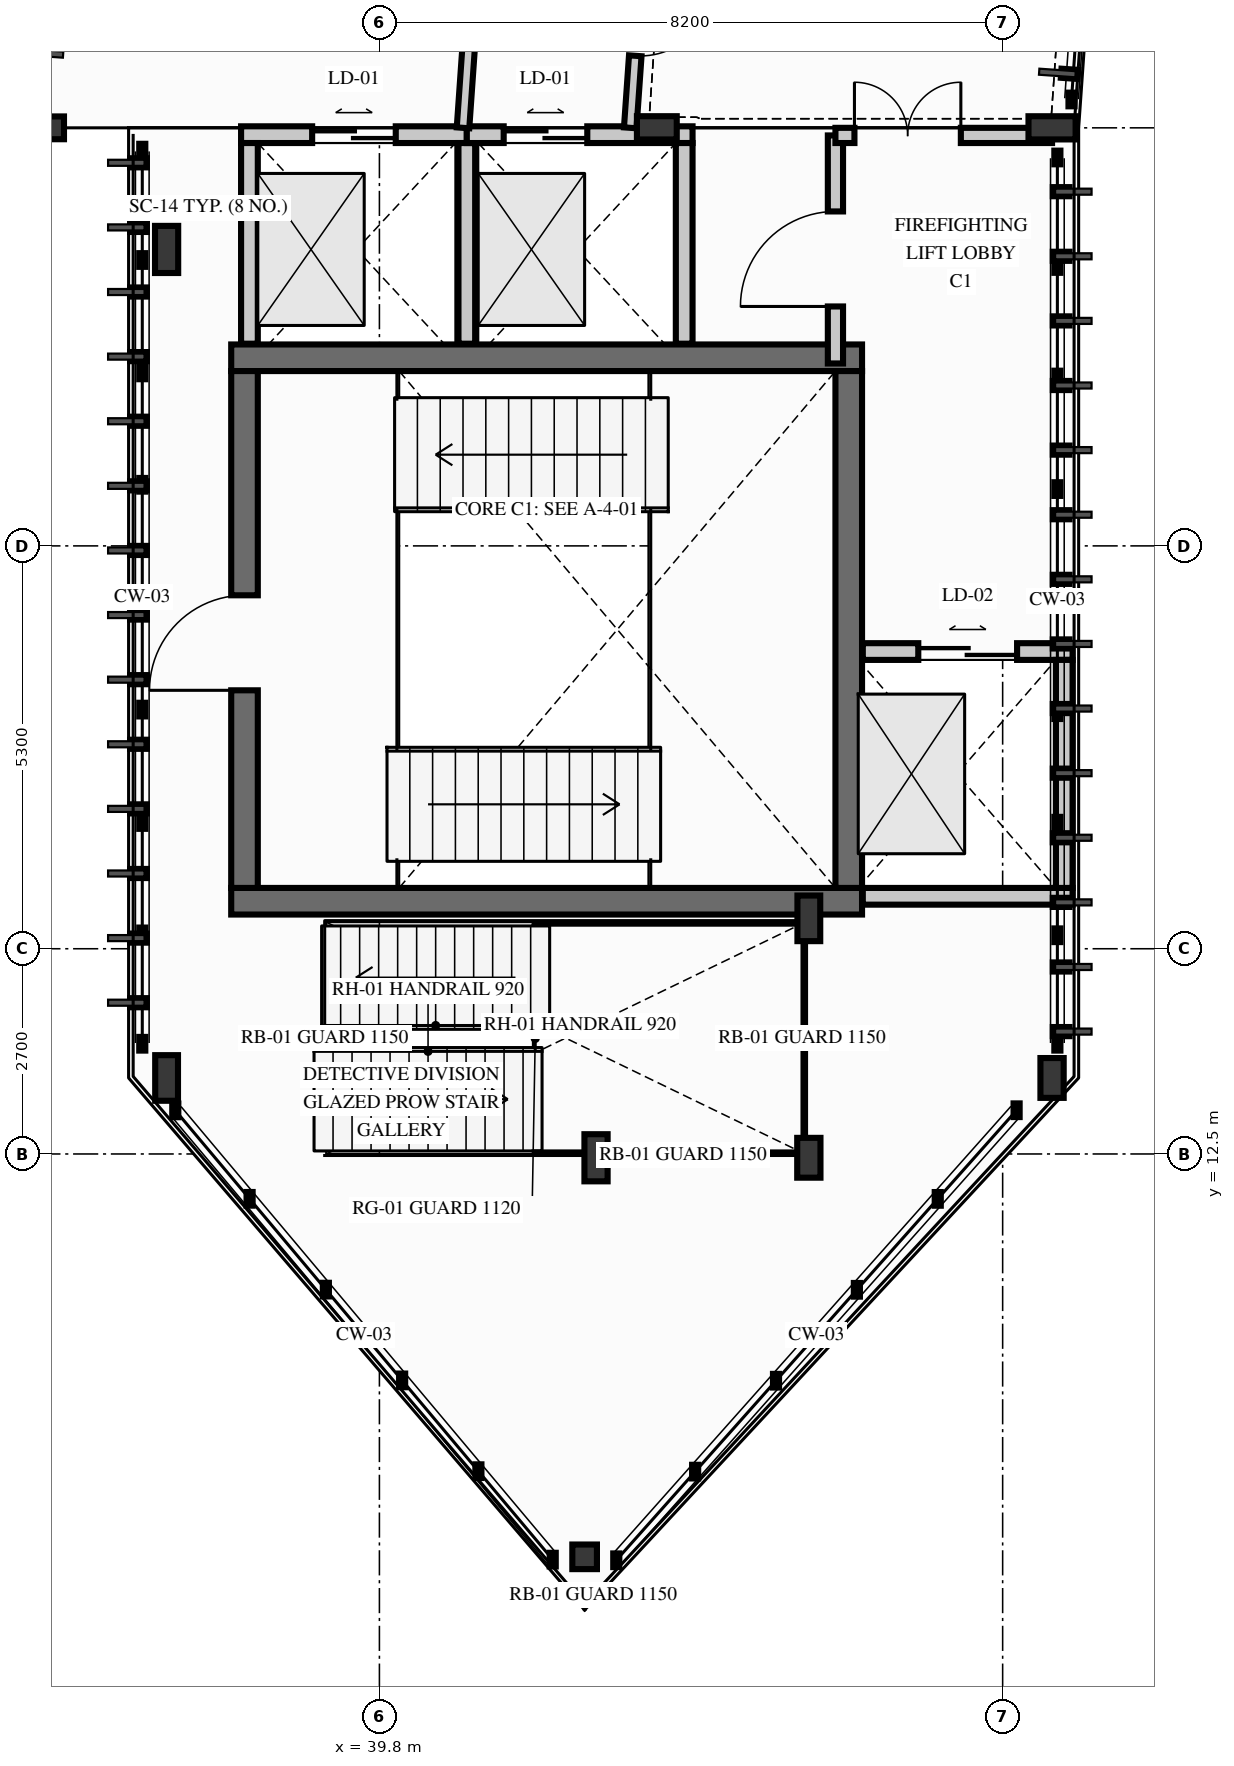
"""IFC4 building model, lengths in metres.
Left out: names, types, materials, properties, quantities, classifications, styles, units other than length and angle.
Written with IfcOpenShell. Run it as: python <this file> out.ifc"""

import sys

from ifc_helpers import new_model, si_unit, direction, frame, frame_2d, origin, origin_2d, place, context, subcontext, project, spatial, rectangle, hollow_circle, i_section, extrude, element, fill, save


model = new_model("IFC4")
c1 = context("Model", 3, precision=1e-05, world=origin(), true_north=direction((0.0, 1.0)))
c2 = subcontext(c1, "Body", "Model", "MODEL_VIEW")
j1 = project(units=[si_unit("LENGTHUNIT", "METRE"), si_unit("PLANEANGLEUNIT", "RADIAN")], contexts=[c1])
p1 = place(None, origin())
s1 = spatial("IfcSite", under=j1, at=p1, CompositionType="ELEMENT")
p2 = place(p1, origin())
s2 = spatial("IfcBuilding", under=s1, at=p2, CompositionType="ELEMENT")
p3 = place(p2, frame((0.0, 0.0, 5.1)))
s3 = spatial("IfcBuildingStorey", under=s2, at=p3, CompositionType="ELEMENT", Elevation=5.1)
for number, where, z_axis, x_axis in (
    (1, (37.85, 15.825, 0.0), (0.0, 0.0, 1.0), (1.0, 0.0, 0.0)),
    (2, (37.85, 22.975, 0.0), (0.0, 0.0, 1.0), (1.0, 0.0, 0.0)),
):
    element("IfcWall", number, at=place(p3, frame(where, z_axis=z_axis, x_axis=x_axis)), inside=s3, PredefinedType="SHEAR", context=c2, shape_type="SweptSolid", body=[
        extrude(rectangle(XDim=8.3, YDim=0.35, at=frame_2d((4.15, 0.0))), origin(), (0.0, 0.0, 1.0), 3.98),
    ])
p4 = place(p3, frame((38.025, 16.0, 0.0), z_axis=(0.0, 0.0, 1.0), x_axis=(0.0, 1.0, 0.0)))
e3 = element("IfcWall", 3, at=p4, inside=s3, PredefinedType="SHEAR", context=c2, shape_type="SweptSolid", body=[
    extrude(rectangle(XDim=6.8, YDim=0.35, at=frame_2d((3.4, 0.0))), origin(), (0.0, 0.0, 1.0), 3.98),
])
p5 = place(p4, frame((2.6, 0.0, 0.0)))
e4 = element("IfcOpeningElement", 4, at=p5, cuts=e3, PredefinedType="OPENING", context=c2, shape_type="SweptSolid", body=[
    extrude(rectangle(XDim=1.25, YDim=2.2, at=frame_2d((0.625, 1.1))), frame((0.0, 0.185, 0.0), z_axis=(0.0, -1.0, 0.0), x_axis=(1.0, 0.0, 0.0)), (0.0, 0.0, 1.0), 0.37),
])
p6 = place(p3, frame((45.975, 16.0, 0.0), z_axis=(0.0, 0.0, 1.0), x_axis=(0.0, 1.0, 0.0)))
e5 = element("IfcWall", 5, at=p6, inside=s3, PredefinedType="SHEAR", context=c2, shape_type="SweptSolid", body=[
    extrude(rectangle(XDim=6.8, YDim=0.35, at=frame_2d((3.4, 0.0))), origin(), (0.0, 0.0, 1.0), 3.98),
])
p7 = place(p3, frame((48.65, 26.0, 0.0), z_axis=(0.0, 0.0, 1.0), x_axis=(0.0, 1.0, 0.0)))
e6 = element("IfcColumn", 6, at=p7, inside=s3, PredefinedType="COLUMN", context=c2, shape_type="SweptSolid", body=[
    extrude(i_section(OverallWidth=0.305, OverallDepth=0.62, WebThickness=0.021, FlangeThickness=0.04, FilletRadius=0.027, at=origin_2d()), origin(), (0.0, 0.0, 1.0), 4.2),
])
p8 = place(p3, frame((43.45, 26.0, 0.0), z_axis=(0.0, 0.0, 1.0), x_axis=(0.0, 1.0, 0.0)))
e7 = element("IfcColumn", 7, at=p8, inside=s3, PredefinedType="COLUMN", context=c2, shape_type="SweptSolid", body=[
    extrude(i_section(OverallWidth=0.306, OverallDepth=0.524, WebThickness=0.021, FlangeThickness=0.04, FilletRadius=0.027, at=origin_2d()), origin(), (0.0, 0.0, 1.0), 4.2),
])
p9 = place(p3, frame((35.35, 26.0, 0.0), z_axis=(0.0, 0.0, 1.0), x_axis=(0.0, 1.0, 0.0)))
e8 = element("IfcColumn", 8, at=p9, inside=s3, PredefinedType="COLUMN", context=c2, shape_type="SweptSolid", body=[
    extrude(i_section(OverallWidth=0.3, OverallDepth=0.6, WebThickness=0.015, FlangeThickness=0.03, FilletRadius=0.027, at=origin_2d()), origin(), (0.0, 0.0, 1.0), 4.2),
])
p10 = place(p3, frame((37.0, 24.4, 0.0), z_axis=(0.0, 0.0, 1.0), x_axis=(1.0, 0.0, 0.0)))
e9 = element("IfcColumn", 9, at=p10, inside=s3, PredefinedType="COLUMN", context=c2, shape_type="SweptSolid", body=[
    extrude(i_section(OverallWidth=0.305, OverallDepth=0.62, WebThickness=0.021, FlangeThickness=0.04, FilletRadius=0.027, at=origin_2d()), origin(), (0.0, 0.0, 1.0), 4.2),
])
p11 = place(p3, frame((48.65, 13.5, 0.0), z_axis=(0.0, 0.0, 1.0), x_axis=(1.0, 0.0, 0.0)))
e10 = element("IfcColumn", 10, at=p11, inside=s3, PredefinedType="COLUMN", context=c2, shape_type="SweptSolid", body=[
    extrude(i_section(OverallWidth=0.306, OverallDepth=0.524, WebThickness=0.021, FlangeThickness=0.04, FilletRadius=0.027, at=origin_2d()), origin(), (0.0, 0.0, 1.0), 4.2),
])
p12 = place(p3, frame((37.0, 13.5, 0.0), z_axis=(0.0, 0.0, 1.0), x_axis=(1.0, 0.0, 0.0)))
e11 = element("IfcColumn", 11, at=p12, inside=s3, PredefinedType="COLUMN", context=c2, shape_type="SweptSolid", body=[
    extrude(i_section(OverallWidth=0.3, OverallDepth=0.6, WebThickness=0.015, FlangeThickness=0.03, FilletRadius=0.027, at=origin_2d()), origin(), (0.0, 0.0, 1.0), 4.2),
])
p13 = place(p3, frame((42.5, 7.2, 0.0), z_axis=(0.0, 0.0, 1.0), x_axis=(1.0, 0.0, 0.0)))
e12 = element("IfcColumn", 12, at=p13, inside=s3, PredefinedType="COLUMN", context=c2, shape_type="SweptSolid", body=[
    extrude(hollow_circle(Radius=0.162, WallThickness=0.016, at=origin_2d()), origin(), (0.0, 0.0, 1.0), 4.2),
])
p14 = place(p3, frame((42.65, 12.45, 0.0), z_axis=(0.0, 0.0, 1.0), x_axis=(1.0, 0.0, 0.0)))
e13 = element("IfcColumn", 13, at=p14, inside=s3, PredefinedType="COLUMN", context=c2, shape_type="SweptSolid", body=[
    extrude(i_section(OverallWidth=0.305, OverallDepth=0.62, WebThickness=0.021, FlangeThickness=0.04, FilletRadius=0.027, at=origin_2d()), origin(), (0.0, 0.0, 1.0), 4.2),
])
p15 = place(p3, frame((45.45, 12.45, 0.0), z_axis=(0.0, 0.0, 1.0), x_axis=(1.0, 0.0, 0.0)))
e14 = element("IfcColumn", 14, at=p15, inside=s3, PredefinedType="COLUMN", context=c2, shape_type="SweptSolid", body=[
    extrude(i_section(OverallWidth=0.306, OverallDepth=0.524, WebThickness=0.021, FlangeThickness=0.04, FilletRadius=0.027, at=origin_2d()), origin(), (0.0, 0.0, 1.0), 4.2),
])
p16 = place(p3, frame((45.45, 15.6, 0.0), z_axis=(0.0, 0.0, 1.0), x_axis=(1.0, 0.0, 0.0)))
e15 = element("IfcColumn", 15, at=p16, inside=s3, PredefinedType="COLUMN", context=c2, shape_type="SweptSolid", body=[
    extrude(i_section(OverallWidth=0.3, OverallDepth=0.6, WebThickness=0.015, FlangeThickness=0.03, FilletRadius=0.027, at=origin_2d()), origin(), (0.0, 0.0, 1.0), 4.2),
])
p17 = place(p3, frame((46.16, 15.89, 0.0), z_axis=(0.0, 0.0, 1.0), x_axis=(1.0, 0.0, 0.0)))
e16 = element("IfcWall", 16, at=p17, inside=s3, PredefinedType="PARTITIONING", context=c2, shape_type="SweptSolid", body=[
    extrude(rectangle(XDim=2.76, YDim=0.22, at=frame_2d((1.38, 0.0))), origin(), (0.0, 0.0, 1.0), 3.618),
])
p18 = place(p3, frame((46.16, 19.11, 0.0), z_axis=(0.0, 0.0, 1.0), x_axis=(1.0, 0.0, 0.0)))
e17 = element("IfcWall", 17, at=p18, inside=s3, PredefinedType="PARTITIONING", context=c2, shape_type="SweptSolid", body=[
    extrude(rectangle(XDim=2.76, YDim=0.22, at=frame_2d((1.38, 0.0))), origin(), (0.0, 0.0, 1.0), 3.618),
])
p19 = place(p18, frame((0.73, 0.0, 0.0)))
e18 = element("IfcOpeningElement", 18, at=p19, cuts=e17, PredefinedType="OPENING", context=c2, shape_type="SweptSolid", body=[
    extrude(rectangle(XDim=1.3, YDim=2.2, at=frame_2d((0.65, 1.1))), frame((0.0, 0.12, 0.0), z_axis=(0.0, -1.0, 0.0), x_axis=(1.0, 0.0, 0.0)), (0.0, 0.0, 1.0), 0.24),
])
p20 = place(p3, frame((48.81, 16.0, 0.0), z_axis=(0.0, 0.0, 1.0), x_axis=(0.0, 1.0, 0.0)))
e19 = element("IfcWall", 19, at=p20, inside=s3, PredefinedType="PARTITIONING", context=c2, shape_type="SweptSolid", body=[
    extrude(rectangle(XDim=3.0, YDim=0.22, at=frame_2d((1.5, 0.0))), origin(), (0.0, 0.0, 1.0), 3.62),
])
p21 = place(p3, frame((37.98, 25.91, 0.0), z_axis=(0.0, 0.0, 1.0), x_axis=(1.0, 0.0, 0.0)))
e20 = element("IfcWall", 20, at=p21, inside=s3, PredefinedType="PARTITIONING", context=c2, shape_type="SweptSolid", body=[
    extrude(rectangle(XDim=2.97, YDim=0.22, at=frame_2d((1.485, 0.0))), origin(), (0.0, 0.0, 1.0), 3.53),
])
p22 = place(p21, frame((0.935, 0.0, 0.0)))
e21 = element("IfcOpeningElement", 21, at=p22, cuts=e20, PredefinedType="OPENING", context=c2, shape_type="SweptSolid", body=[
    extrude(rectangle(XDim=1.1, YDim=2.15, at=frame_2d((0.55, 1.075))), frame((0.0, 0.12, 0.0), z_axis=(0.0, -1.0, 0.0), x_axis=(1.0, 0.0, 0.0)), (0.0, 0.0, 1.0), 0.24),
])
for number, where, z_axis, x_axis in (
    (22, (38.09, 23.16, 0.0), (0.0, 0.0, 1.0), (0.0, 1.0, 0.0)),
    (23, (40.95, 23.16, 0.0), (0.0, 0.0, 1.0), (0.0, 1.0, 0.0)),
):
    element("IfcWall", number, at=place(p3, frame(where, z_axis=z_axis, x_axis=x_axis)), inside=s3, PredefinedType="PARTITIONING", context=c2, shape_type="SweptSolid", body=[
        extrude(rectangle(XDim=2.64, YDim=0.22, at=frame_2d((1.32, 0.0))), origin(), (0.0, 0.0, 1.0), 3.92),
    ])
p23 = place(p3, frame((40.95, 25.91, 0.0), z_axis=(0.0, 0.0, 1.0), x_axis=(1.0, 0.0, 0.0)))
e24 = element("IfcWall", 24, at=p23, inside=s3, PredefinedType="PARTITIONING", context=c2, shape_type="SweptSolid", body=[
    extrude(rectangle(XDim=2.97, YDim=0.22, at=frame_2d((1.485, 0.0))), origin(), (0.0, 0.0, 1.0), 3.53),
])
p24 = place(p23, frame((0.485, 0.0, 0.0)))
e25 = element("IfcOpeningElement", 25, at=p24, cuts=e24, PredefinedType="OPENING", context=c2, shape_type="SweptSolid", body=[
    extrude(rectangle(XDim=1.1, YDim=2.15, at=frame_2d((0.55, 1.075))), frame((0.0, 0.12, 0.0), z_axis=(0.0, -1.0, 0.0), x_axis=(1.0, 0.0, 0.0)), (0.0, 0.0, 1.0), 0.24),
])
p25 = place(p3, frame((43.81, 23.16, 0.0), z_axis=(0.0, 0.0, 1.0), x_axis=(0.0, 1.0, 0.0)))
e26 = element("IfcWall", 26, at=p25, inside=s3, PredefinedType="PARTITIONING", context=c2, shape_type="SweptSolid", body=[
    extrude(rectangle(XDim=2.64, YDim=0.22, at=frame_2d((1.32, 0.0))), origin(), (0.0, 0.0, 1.0), 3.92),
])
p26 = place(p3, frame((45.8, 22.9, 0.0), z_axis=(0.0, 0.0, 1.0), x_axis=(0.0, 1.0, 0.0)))
e27 = element("IfcWall", 27, at=p26, inside=s3, PredefinedType="PARTITIONING", context=c2, shape_type="SweptSolid", body=[
    extrude(rectangle(XDim=3.0, YDim=0.2, at=frame_2d((1.5, 0.0))), origin(), (0.0, 0.0, 1.0), 3.92),
])
p27 = place(p26, frame((0.75, 0.0, 0.0)))
e28 = element("IfcOpeningElement", 28, at=p27, cuts=e27, PredefinedType="OPENING", context=c2, shape_type="SweptSolid", body=[
    extrude(rectangle(XDim=1.25, YDim=2.2, at=frame_2d((0.625, 1.1))), frame((0.0, 0.11, 0.0), z_axis=(0.0, -1.0, 0.0), x_axis=(1.0, 0.0, 0.0)), (0.0, 0.0, 1.0), 0.22),
])
p28 = place(p3, frame((45.8, 25.9, 0.0), z_axis=(0.0, 0.0, 1.0), x_axis=(1.0, 0.0, 0.0)))
e29 = element("IfcWall", 29, at=p28, inside=s3, PredefinedType="PARTITIONING", context=c2, shape_type="SweptSolid", body=[
    extrude(rectangle(XDim=2.85, YDim=0.2, at=frame_2d((1.425, 0.0))), origin(), (0.0, 0.0, 1.0), 3.58),
])
p29 = place(p28, frame((0.25, 0.0, 0.0)))
e30 = element("IfcOpeningElement", 30, at=p29, cuts=e29, PredefinedType="OPENING", context=c2, shape_type="SweptSolid", body=[
    extrude(rectangle(XDim=1.4, YDim=2.25, at=frame_2d((0.7, 1.125))), frame((0.0, 0.11, 0.0), z_axis=(0.0, -1.0, 0.0), x_axis=(1.0, 0.0, 0.0)), (0.0, 0.0, 1.0), 0.22),
])
p30 = place(p3, frame((43.595, 33.084, 0.0), z_axis=(0.0, 0.0, 1.0), x_axis=(-0.069756597752, -0.997564041588, 0.0)))
e31 = element("IfcWall", 31, at=p30, inside=s3, PredefinedType="PARTITIONING", context=c2, shape_type="SweptSolid", body=[
    extrude(rectangle(XDim=7.101, YDim=0.165, at=frame_2d((3.551, 0.0))), origin(), (0.0, 0.0, 1.0), 3.92),
])
p31 = place(p30, frame((5.201, 0.0, 0.0)))
e32 = element("IfcOpeningElement", 32, at=p31, cuts=e31, PredefinedType="OPENING", context=c2, shape_type="SweptSolid", body=[
    extrude(rectangle(XDim=0.95, YDim=2.15, at=frame_2d((0.475, 1.075))), frame((0.0, 0.093, 0.0), z_axis=(0.0, -1.0, 0.0), x_axis=(1.0, 0.0, 0.0)), (0.0, 0.0, 1.0), 0.185),
])
p32 = place(p30, frame((1.2, 0.0, 0.0)))
e33 = element("IfcOpeningElement", 33, at=p32, cuts=e31, PredefinedType="OPENING", context=c2, shape_type="SweptSolid", body=[
    extrude(rectangle(XDim=0.95, YDim=2.15, at=frame_2d((0.475, 1.075))), frame((0.0, 0.093, 0.0), z_axis=(0.0, -1.0, 0.0), x_axis=(1.0, 0.0, 0.0)), (0.0, 0.0, 1.0), 0.185),
])
p33 = place(p3, frame((41.417, 33.39, 0.0), z_axis=(0.0, 0.0, 1.0), x_axis=(-0.069766817412, -0.997563326906, 0.0)))
e34 = element("IfcWall", 34, at=p33, inside=s3, PredefinedType="PARTITIONING", context=c2, shape_type="SweptSolid", body=[
    extrude(rectangle(XDim=7.408, YDim=0.165, at=frame_2d((3.704, 0.0))), origin(), (0.0, 0.0, 1.0), 3.92),
])
p34 = place(p33, frame((3.111, 0.0, 0.0)))
e35 = element("IfcOpeningElement", 35, at=p34, cuts=e34, PredefinedType="OPENING", context=c2, shape_type="SweptSolid", body=[
    extrude(rectangle(XDim=1.76, YDim=2.36, at=frame_2d((0.88, 1.18))), frame((0.0, 0.093, 0.0), z_axis=(0.0, -1.0, 0.0), x_axis=(1.0, 0.0, 0.0)), (0.0, 0.0, 1.0), 0.185),
])
p35 = place(p5, origin())
e36 = element("IfcDoor", 36, at=p35, inside=s3, OperationType="SINGLE_SWING_LEFT", PredefinedType="DOOR", context=c2, shape_type="SweptSolid", body=[
    extrude(rectangle(XDim=1.25, YDim=2.2, at=frame_2d((0.625, 1.1))), frame((0.0, 0.025, 0.0), z_axis=(0.0, -1.0, 0.0), x_axis=(1.0, 0.0, 0.0)), (0.0, 0.0, 1.0), 0.05),
])
fill(e4, e36)
p36 = place(p19, origin())
e37 = element("IfcDoor", 37, at=p36, inside=s3, OperationType="DOUBLE_DOOR_SLIDING", PredefinedType="DOOR", context=c2, shape_type="SweptSolid", body=[
    extrude(rectangle(XDim=1.3, YDim=2.2, at=frame_2d((0.65, 1.1))), frame((0.0, 0.025, 0.0), z_axis=(0.0, -1.0, 0.0), x_axis=(1.0, 0.0, 0.0)), (0.0, 0.0, 1.0), 0.05),
])
fill(e18, e37)
p37 = place(p22, origin())
e38 = element("IfcDoor", 38, at=p37, inside=s3, OperationType="DOUBLE_DOOR_SLIDING", PredefinedType="DOOR", context=c2, shape_type="SweptSolid", body=[
    extrude(rectangle(XDim=1.1, YDim=2.15, at=frame_2d((0.55, 1.075))), frame((0.0, 0.025, 0.0), z_axis=(0.0, -1.0, 0.0), x_axis=(1.0, 0.0, 0.0)), (0.0, 0.0, 1.0), 0.05),
])
fill(e21, e38)
p38 = place(p24, origin())
e39 = element("IfcDoor", 39, at=p38, inside=s3, OperationType="DOUBLE_DOOR_SLIDING", PredefinedType="DOOR", context=c2, shape_type="SweptSolid", body=[
    extrude(rectangle(XDim=1.1, YDim=2.15, at=frame_2d((0.55, 1.075))), frame((0.0, 0.025, 0.0), z_axis=(0.0, -1.0, 0.0), x_axis=(1.0, 0.0, 0.0)), (0.0, 0.0, 1.0), 0.05),
])
fill(e25, e39)
p39 = place(p29, origin())
e40 = element("IfcDoor", 40, at=p39, inside=s3, OperationType="DOUBLE_DOOR_SINGLE_SWING", PredefinedType="DOOR", context=c2, shape_type="SweptSolid", body=[
    extrude(rectangle(XDim=1.4, YDim=2.25, at=frame_2d((0.7, 1.125))), frame((0.0, 0.025, 0.0), z_axis=(0.0, -1.0, 0.0), x_axis=(1.0, 0.0, 0.0)), (0.0, 0.0, 1.0), 0.05),
])
fill(e30, e40)
p40 = place(p27, origin())
e41 = element("IfcDoor", 41, at=p40, inside=s3, OperationType="SINGLE_SWING_LEFT", PredefinedType="DOOR", context=c2, shape_type="SweptSolid", body=[
    extrude(rectangle(XDim=1.25, YDim=2.2, at=frame_2d((0.625, 1.1))), frame((0.0, 0.025, 0.0), z_axis=(0.0, -1.0, 0.0), x_axis=(1.0, 0.0, 0.0)), (0.0, 0.0, 1.0), 0.05),
])
fill(e28, e41)
p41 = place(p31, origin())
e42 = element("IfcDoor", 42, at=p41, inside=s3, OperationType="SINGLE_SWING_LEFT", PredefinedType="DOOR", context=c2, shape_type="SweptSolid", body=[
    extrude(rectangle(XDim=0.95, YDim=2.15, at=frame_2d((0.475, 1.075))), frame((0.0, 0.025, 0.0), z_axis=(0.0, -1.0, 0.0), x_axis=(1.0, 0.0, 0.0)), (0.0, 0.0, 1.0), 0.05),
])
fill(e32, e42)
save(model, sys.argv[1])
